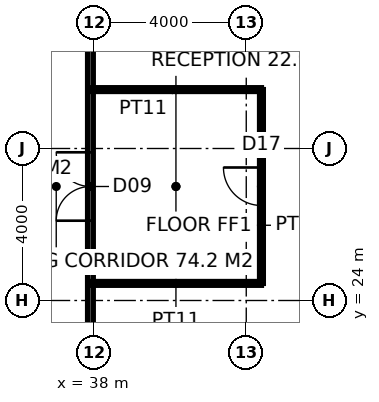
"""IFC4 building model, lengths in metres.
Left out: names, types, materials, properties, quantities, classifications, styles, units other than length and angle.
Written with IfcOpenShell. Run it as: python <this file> out.ifc"""

import sys

from ifc_helpers import new_model, si_unit, direction, frame, frame_2d, origin, place, context, subcontext, project, spatial, rectangle, extrude, element, fill, save


model = new_model("IFC4")
c1 = context("Model", 3, precision=1e-05, world=origin(), true_north=direction((0.0, 1.0)))
c2 = subcontext(c1, "Body", "Model", "MODEL_VIEW")
j1 = project(units=[si_unit("LENGTHUNIT", "METRE"), si_unit("PLANEANGLEUNIT", "RADIAN")], contexts=[c1])
p1 = place(None, origin())
s1 = spatial("IfcSite", under=j1, at=p1, CompositionType="ELEMENT")
p2 = place(p1, origin())
s2 = spatial("IfcBuilding", under=s1, at=p2, CompositionType="ELEMENT")
p3 = place(p2, frame((0.0, 0.0, 175.8)))
s3 = spatial("IfcBuildingStorey", under=s2, at=p3, CompositionType="ELEMENT", Elevation=175.8)
p4 = place(p3, frame((37.9, 15.625, 0.0), z_axis=(0.0, 0.0, 1.0), x_axis=(0.0, 1.0, 0.0)))
e1 = element("IfcWall", 1, at=p4, inside=s3, PredefinedType="PARTITIONING", context=c2, shape_type="SweptSolid", body=[
    extrude(rectangle(XDim=22.75, YDim=0.15, at=frame_2d((11.375, 0.0))), origin(), (0.0, 0.0, 1.0), 2.95),
])
p5 = place(p4, frame((10.475, 0.0, 0.0)))
e2 = element("IfcOpeningElement", 2, at=p5, cuts=e1, PredefinedType="OPENING", context=c2, shape_type="SweptSolid", body=[
    extrude(rectangle(XDim=1.8, YDim=2.4, at=frame_2d((0.9, 1.2))), frame((0.0, 0.085, 0.0), z_axis=(0.0, -1.0, 0.0), x_axis=(1.0, 0.0, 0.0)), (0.0, 0.0, 1.0), 0.17),
])
p6 = place(p3, frame((37.9, 24.45, 0.0), z_axis=(0.0, 0.0, 1.0), x_axis=(1.0, 0.0, 0.0)))
e3 = element("IfcWall", 3, at=p6, inside=s3, PredefinedType="PARTITIONING", context=c2, shape_type="SweptSolid", body=[
    extrude(rectangle(XDim=4.5, YDim=0.1, at=frame_2d((2.25, 0.0))), origin(), (0.0, 0.0, 1.0), 3.85),
])
p7 = place(p3, frame((42.4, 24.45, 0.0), z_axis=(0.0, 0.0, 1.0), x_axis=(0.0, 1.0, 0.0)))
e4 = element("IfcWall", 4, at=p7, inside=s3, PredefinedType="PARTITIONING", context=c2, shape_type="SweptSolid", body=[
    extrude(rectangle(XDim=5.1, YDim=0.1, at=frame_2d((2.55, 0.0))), origin(), (0.0, 0.0, 1.0), 3.85),
])
p8 = place(p7, frame((2.05, 0.0, 0.0)))
e5 = element("IfcOpeningElement", 5, at=p8, cuts=e4, PredefinedType="OPENING", context=c2, shape_type="SweptSolid", body=[
    extrude(rectangle(XDim=1.0, YDim=2.2, at=frame_2d((0.5, 1.1))), frame((0.0, 0.06, 0.0), z_axis=(0.0, -1.0, 0.0), x_axis=(1.0, 0.0, 0.0)), (0.0, 0.0, 1.0), 0.12),
])
p9 = place(p3, frame((42.4, 29.55, 0.0), z_axis=(0.0, 0.0, 1.0), x_axis=(-1.0, 0.0, 0.0)))
e6 = element("IfcWall", 6, at=p9, inside=s3, PredefinedType="PARTITIONING", context=c2, shape_type="SweptSolid", body=[
    extrude(rectangle(XDim=4.5, YDim=0.1, at=frame_2d((2.25, 0.0))), origin(), (0.0, 0.0, 1.0), 3.85),
])
p10 = place(p5, origin())
e7 = element("IfcDoor", 7, at=p10, inside=s3, OperationType="DOUBLE_DOOR_DOUBLE_SWING", PredefinedType="DOOR", context=c2, shape_type="SweptSolid", body=[
    extrude(rectangle(XDim=1.8, YDim=2.4, at=frame_2d((0.9, 1.2))), frame((0.0, 0.025, 0.0), z_axis=(0.0, -1.0, 0.0), x_axis=(1.0, 0.0, 0.0)), (0.0, 0.0, 1.0), 0.05),
])
fill(e2, e7)
p11 = place(p8, origin())
e8 = element("IfcDoor", 8, at=p11, inside=s3, OperationType="SINGLE_SWING_RIGHT", PredefinedType="DOOR", context=c2, shape_type="SweptSolid", body=[
    extrude(rectangle(XDim=1.0, YDim=2.2, at=frame_2d((0.5, 1.1))), frame((0.0, 0.025, 0.0), z_axis=(0.0, -1.0, 0.0), x_axis=(1.0, 0.0, 0.0)), (0.0, 0.0, 1.0), 0.05),
])
fill(e5, e8)
save(model, sys.argv[1])
